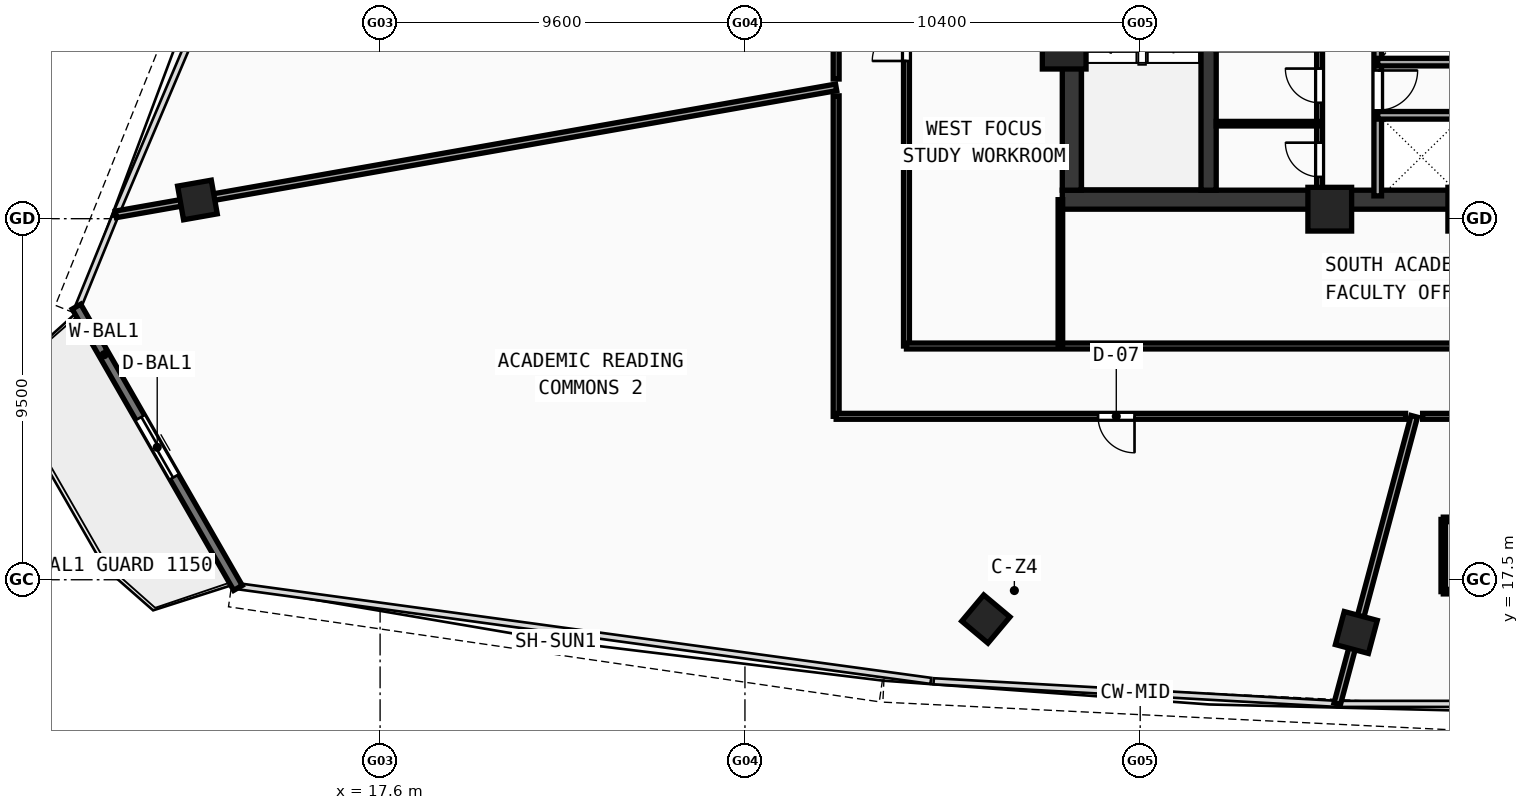
"""IFC4 building model, lengths in metres.
Left out: names, types, materials, properties, quantities, classifications, styles, units other than length and angle.
Written with IfcOpenShell. Run it as: python <this file> out.ifc"""

import sys

from ifc_helpers import new_model, si_unit, direction, frame, frame_2d, origin, origin_with_axes, origin_2d, place, context, subcontext, project, spatial, rectangle, hollow_rectangle, extrude, source, transform, mapped, element, fill, save


model = new_model("IFC4")
c1 = context("Model", 3, precision=1e-05, world=origin(), true_north=direction((0.0, 1.0)))
c2 = subcontext(c1, "Body", "Model", "MODEL_VIEW")
j1 = project(units=[si_unit("LENGTHUNIT", "METRE"), si_unit("PLANEANGLEUNIT", "RADIAN")], contexts=[c1])
p1 = place(None, origin())
s1 = spatial("IfcSite", under=j1, at=p1, CompositionType="ELEMENT")
p2 = place(p1, origin())
s2 = spatial("IfcBuilding", under=s1, at=p2, CompositionType="ELEMENT")
p3 = place(p2, frame((0.0, 0.0, 199.96)))
s3 = spatial("IfcBuildingStorey", under=s2, at=p3, CompositionType="ELEMENT", Elevation=199.96)
p4 = place(p3, frame((35.55, 27.5, 0.0), z_axis=(0.0, 0.0, 1.0), x_axis=(1.0, 0.0, 0.0)))
e1 = element("IfcWall", 1, at=p4, inside=s3, PredefinedType="SHEAR", context=c2, shape_type="SweptSolid", body=[
    extrude(rectangle(XDim=24.9, YDim=0.5, at=frame_2d((12.45, 0.0))), origin(), (0.0, 0.0, 1.0), 3.54),
])
p5 = place(p3, frame((35.8, 27.75, 0.0), z_axis=(0.0, 0.0, 1.0), x_axis=(0.0, 1.0, 0.0)))
e2 = element("IfcWall", 2, at=p5, inside=s3, PredefinedType="SHEAR", context=c2, shape_type="SweptSolid", body=[
    extrude(rectangle(XDim=12.2, YDim=0.5, at=frame_2d((6.1, 0.0))), origin(), (0.0, 0.0, 1.0), 3.54),
])
p6 = place(p3, frame((39.4, 27.75, 0.0), z_axis=(0.0, 0.0, 1.0), x_axis=(0.0, 1.0, 0.0)))
e3 = element("IfcWall", 3, at=p6, inside=s3, PredefinedType="SHEAR", context=c2, shape_type="SweptSolid", body=[
    extrude(rectangle(XDim=12.2, YDim=0.4, at=frame_2d((6.1, 0.0))), origin(), (0.0, 0.0, 1.0), 3.54),
])
p7 = place(p6, frame((10.0, 0.0, 0.0)))
e4 = element("IfcOpeningElement", 4, at=p7, cuts=e3, PredefinedType="OPENING", context=c2, shape_type="SweptSolid", body=[
    extrude(rectangle(XDim=1.1, YDim=2.1, at=frame_2d((0.55, 1.05))), frame((0.0, 0.21, 0.0), z_axis=(0.0, -1.0, 0.0), x_axis=(1.0, 0.0, 0.0)), (0.0, 0.0, 1.0), 0.42),
])
m1 = source(origin(), c2, "Body", "SweptSolid", [
    extrude(hollow_rectangle(XDim=1.15, YDim=1.15, WallThickness=0.048, at=origin_2d()), origin(), (0.0, 0.0, 1.0), 3.8),
])
for number, where, z_axis, x_axis in (
    (5, (42.588, 27.25, -0.26), (0.0, 0.0, 1.0), (1.0, 0.0, 0.0)),
    (6, (46.272, 27.25, -0.26), (0.0, 0.0, 1.0), (1.0, 0.0, 0.0)),
    (7, (35.6, 31.513, -0.26), (0.0, 0.0, 1.0), (1.0, 0.0, 0.0)),
):
    element("IfcColumn", number, at=place(p3, frame(where, z_axis=z_axis, x_axis=x_axis)), inside=s3, PredefinedType="COLUMN", context=c2, shape_type="MappedRepresentation", body=[
        mapped(m1, transform((0.0, 0.0, 0.0), scale=1.0)),
    ])
m2 = source(origin(), c2, "Body", "SweptSolid", [
    extrude(hollow_rectangle(XDim=0.9, YDim=0.9, WallThickness=0.036, at=origin_2d()), origin(), (0.0, 0.0, 1.0), 3.8),
])
for number, where, z_axis, x_axis in (
    (8, (33.539, 16.466, -0.26), (0.0, 0.0, 1.0), (0.766, -0.643, 0.0)),
    (9, (43.288, 16.112, -0.26), (0.0, 0.0, 1.0), (0.966, -0.259, 0.0)),
    (10, (12.793, 27.492, -0.26), (0.0, 0.0, 1.0), (0.174, -0.985, 0.0)),
):
    element("IfcColumn", number, at=place(p3, frame(where, z_axis=z_axis, x_axis=x_axis)), inside=s3, PredefinedType="COLUMN", context=c2, shape_type="MappedRepresentation", body=[
        mapped(m2, transform((0.0, 0.0, 0.0), scale=1.0)),
    ])
p8 = place(p3, frame((9.611, 24.686, 0.0), z_axis=(0.0, 0.0, 1.0), x_axis=(0.497930869929, -0.867216725376, 0.0)))
e11 = element("IfcWall", 11, at=p8, inside=s3, PredefinedType="STANDARD", context=c2, shape_type="SweptSolid", body=[
    extrude(rectangle(XDim=8.534, YDim=0.26, at=frame_2d((4.267, 0.0))), origin(), (0.0, 0.0, 1.0), 3.54),
])
p9 = place(p8, frame((3.367, 0.0, 0.0)))
e12 = element("IfcOpeningElement", 12, at=p9, cuts=e11, PredefinedType="OPENING", context=c2, shape_type="SweptSolid", body=[
    extrude(rectangle(XDim=1.8, YDim=2.15, at=frame_2d((0.9, 1.075))), frame((0.0, 0.14, 0.0), z_axis=(0.0, -1.0, 0.0), x_axis=(1.0, 0.0, 0.0)), (0.0, 0.0, 1.0), 0.28),
])
p10 = place(p3, frame((43.85, 27.6, 0.0), z_axis=(0.0, 0.0, 1.0), x_axis=(0.0, 1.0, 0.0)))
e13 = element("IfcWall", 13, at=p10, inside=s3, PredefinedType="SOLIDWALL", context=c2, shape_type="SweptSolid", body=[
    extrude(rectangle(XDim=6.22, YDim=0.2, at=frame_2d((3.11, 0.0))), origin(), (0.0, 0.0, 1.0), 3.54),
])
p11 = place(p10, frame((2.25, 0.0, 0.0)))
e14 = element("IfcOpeningElement", 14, at=p11, cuts=e13, PredefinedType="OPENING", context=c2, shape_type="SweptSolid", body=[
    extrude(rectangle(XDim=1.05, YDim=2.1, at=frame_2d((0.525, 1.05))), frame((0.0, 0.11, 0.0), z_axis=(0.0, -1.0, 0.0), x_axis=(1.0, 0.0, 0.0)), (0.0, 0.0, 1.0), 0.22),
])
p12 = place(p3, frame((43.85, 29.72, 0.0), z_axis=(0.0, 0.0, 1.0), x_axis=(1.0, 0.0, 0.0)))
e15 = element("IfcWall", 15, at=p12, inside=s3, PredefinedType="SOLIDWALL", context=c2, shape_type="SweptSolid", body=[
    extrude(rectangle(XDim=7.2, YDim=0.2, at=frame_2d((3.6, 0.0))), origin(), (0.0, 0.0, 1.0), 3.54),
])
p13 = place(p3, frame((43.85, 31.12, 0.0), z_axis=(0.0, 0.0, 1.0), x_axis=(1.0, 0.0, 0.0)))
e16 = element("IfcWall", 16, at=p13, inside=s3, PredefinedType="SOLIDWALL", context=c2, shape_type="SweptSolid", body=[
    extrude(rectangle(XDim=9.83, YDim=0.2, at=frame_2d((4.915, 0.0))), origin(), (0.0, 0.0, 1.0), 3.54),
])
p14 = place(p3, frame((42.32, 27.6, 0.0), z_axis=(0.0, 0.0, 1.0), x_axis=(0.0, 1.0, 0.0)))
e17 = element("IfcWall", 17, at=p14, inside=s3, PredefinedType="PARTITIONING", context=c2, shape_type="SweptSolid", body=[
    extrude(rectangle(XDim=5.9, YDim=0.155, at=frame_2d((2.95, 0.0))), origin(), (0.0, 0.0, 1.0), 3.54),
])
p15 = place(p14, frame((0.5, 0.0, 0.0)))
e18 = element("IfcOpeningElement", 18, at=p15, cuts=e17, PredefinedType="OPENING", context=c2, shape_type="SweptSolid", body=[
    extrude(rectangle(XDim=0.9, YDim=2.1, at=frame_2d((0.45, 1.05))), frame((0.0, 0.087, 0.0), z_axis=(0.0, -1.0, 0.0), x_axis=(1.0, 0.0, 0.0)), (0.0, 0.0, 1.0), 0.175),
])
p16 = place(p14, frame((2.45, 0.0, 0.0)))
e19 = element("IfcOpeningElement", 19, at=p16, cuts=e17, PredefinedType="OPENING", context=c2, shape_type="SweptSolid", body=[
    extrude(rectangle(XDim=0.9, YDim=2.1, at=frame_2d((0.45, 1.05))), frame((0.0, 0.087, 0.0), z_axis=(0.0, -1.0, 0.0), x_axis=(1.0, 0.0, 0.0)), (0.0, 0.0, 1.0), 0.175),
])
p17 = place(p14, frame((4.42, 0.0, 0.0)))
e20 = element("IfcOpeningElement", 20, at=p17, cuts=e17, PredefinedType="OPENING", context=c2, shape_type="SweptSolid", body=[
    extrude(rectangle(XDim=0.94, YDim=2.1, at=frame_2d((0.47, 1.05))), frame((0.0, 0.087, 0.0), z_axis=(0.0, -1.0, 0.0), x_axis=(1.0, 0.0, 0.0)), (0.0, 0.0, 1.0), 0.175),
])
p18 = place(p3, frame((39.6, 29.5, 0.0), z_axis=(0.0, 0.0, 1.0), x_axis=(1.0, 0.0, 0.0)))
e21 = element("IfcWall", 21, at=p18, inside=s3, PredefinedType="PARTITIONING", context=c2, shape_type="SweptSolid", body=[
    extrude(rectangle(XDim=2.72, YDim=0.12, at=frame_2d((1.36, 0.0))), origin(), (0.0, 0.0, 1.0), 3.54),
])
p19 = place(p3, frame((31.45, 23.65, 0.0), z_axis=(0.0, 0.0, 1.0), x_axis=(0.0, 1.0, 0.0)))
e22 = element("IfcWall", 22, at=p19, inside=s3, PredefinedType="PARTITIONING", context=c2, shape_type="SweptSolid", body=[
    extrude(rectangle(XDim=16.6, YDim=0.155, at=frame_2d((8.3, 0.0))), origin(), (0.0, 0.0, 1.0), 2.89),
])
p20 = place(p19, frame((7.5, 0.0, 0.0)))
e23 = element("IfcOpeningElement", 23, at=p20, cuts=e22, PredefinedType="OPENING", context=c2, shape_type="SweptSolid", body=[
    extrude(rectangle(XDim=0.9, YDim=2.08, at=frame_2d((0.45, 1.04))), frame((0.0, 0.087, 0.0), z_axis=(0.0, -1.0, 0.0), x_axis=(1.0, 0.0, 0.0)), (0.0, 0.0, 1.0), 0.175),
])
p21 = place(p3, frame((31.45, 23.65, 0.0), z_axis=(0.0, 0.0, 1.0), x_axis=(1.0, 0.0, 0.0)))
e24 = element("IfcWall", 24, at=p21, inside=s3, PredefinedType="PARTITIONING", context=c2, shape_type="SweptSolid", body=[
    extrude(rectangle(XDim=33.1, YDim=0.155, at=frame_2d((16.55, 0.0))), origin(), (0.0, 0.0, 1.0), 2.89),
])
p22 = place(p21, frame((16.0, 0.0, 0.0)))
e25 = element("IfcOpeningElement", 25, at=p22, cuts=e24, PredefinedType="OPENING", context=c2, shape_type="SweptSolid", body=[
    extrude(rectangle(XDim=0.92, YDim=2.1, at=frame_2d((0.46, 1.05))), frame((0.0, 0.087, 0.0), z_axis=(0.0, -1.0, 0.0), x_axis=(1.0, 0.0, 0.0)), (0.0, 0.0, 1.0), 0.175),
])
p23 = place(p3, frame((35.5, 23.65, 0.0), z_axis=(0.0, 0.0, 1.0), x_axis=(0.0, 1.0, 0.0)))
e26 = element("IfcWall", 26, at=p23, inside=s3, PredefinedType="PARTITIONING", context=c2, shape_type="SweptSolid", body=[
    extrude(rectangle(XDim=3.85, YDim=0.12, at=frame_2d((1.925, 0.0))), origin(), (0.0, 0.0, 1.0), 3.14),
])
p24 = place(p3, frame((29.6, 30.456, 0.0), z_axis=(0.0, 0.0, 1.0), x_axis=(-0.984807685374, -0.173648561263, 0.0)))
e27 = element("IfcWall", 27, at=p24, inside=s3, PredefinedType="PARTITIONING", context=c2, shape_type="SweptSolid", body=[
    extrude(rectangle(XDim=19.246, YDim=0.175, at=frame_2d((9.623, 0.0))), origin(), (0.0, 0.0, 1.0), 2.89),
])
p25 = place(p3, frame((44.811, 21.8, 0.0), z_axis=(0.0, 0.0, 1.0), x_axis=(-0.258810863021, -0.965928018634, 0.0)))
e28 = element("IfcWall", 28, at=p25, inside=s3, PredefinedType="PARTITIONING", context=c2, shape_type="SweptSolid", body=[
    extrude(rectangle(XDim=7.833, YDim=0.175, at=frame_2d((3.917, 0.0))), origin(), (0.0, 0.0, 1.0), 2.89),
])
p26 = place(p3, frame((29.6, 21.8, 0.0), z_axis=(0.0, 0.0, 1.0), x_axis=(0.0, 1.0, 0.0)))
e29 = element("IfcWall", 29, at=p26, inside=s3, PredefinedType="PARTITIONING", context=c2, shape_type="SweptSolid", body=[
    extrude(rectangle(XDim=8.432, YDim=0.155, at=frame_2d((4.216, 0.0))), origin(), (0.0, 0.0, 1.0), 3.14),
])
p27 = place(p3, frame((29.6, 30.675, 0.0), z_axis=(0.0, 0.0, 1.0), x_axis=(0.0, 1.0, 0.0)))
e30 = element("IfcWall", 30, at=p27, inside=s3, PredefinedType="PARTITIONING", context=c2, shape_type="SweptSolid", body=[
    extrude(rectangle(XDim=8.783, YDim=0.155, at=frame_2d((4.392, 0.0))), origin(), (0.0, 0.0, 1.0), 3.14),
])
p28 = place(p27, frame((3.932, 0.0, 0.0)))
e31 = element("IfcOpeningElement", 31, at=p28, cuts=e30, PredefinedType="OPENING", context=c2, shape_type="SweptSolid", body=[
    extrude(rectangle(XDim=0.92, YDim=2.1, at=frame_2d((0.46, 1.05))), frame((0.0, 0.087, 0.0), z_axis=(0.0, -1.0, 0.0), x_axis=(1.0, 0.0, 0.0)), (0.0, 0.0, 1.0), 0.175),
])
p29 = place(p3, frame((50.969, 21.8, 0.0), z_axis=(0.0, 0.0, 1.0), x_axis=(-1.0, 0.0, 0.0)))
e32 = element("IfcWall", 32, at=p29, inside=s3, PredefinedType="PARTITIONING", context=c2, shape_type="SweptSolid", body=[
    extrude(rectangle(XDim=5.938, YDim=0.155, at=frame_2d((2.969, 0.0))), origin(), (0.0, 0.0, 1.0), 3.54),
])
p30 = place(p29, frame((2.494, 0.0, 0.0)))
e33 = element("IfcOpeningElement", 33, at=p30, cuts=e32, PredefinedType="OPENING", context=c2, shape_type="SweptSolid", body=[
    extrude(rectangle(XDim=0.96, YDim=2.12, at=frame_2d((0.48, 1.06))), frame((0.0, 0.087, 0.0), z_axis=(0.0, -1.0, 0.0), x_axis=(1.0, 0.0, 0.0)), (0.0, 0.0, 1.0), 0.175),
])
p31 = place(p3, frame((44.583, 21.8, 0.0), z_axis=(0.0, 0.0, 1.0), x_axis=(-1.0, 0.0, 0.0)))
e34 = element("IfcWall", 34, at=p31, inside=s3, PredefinedType="PARTITIONING", context=c2, shape_type="SweptSolid", body=[
    extrude(rectangle(XDim=14.983, YDim=0.155, at=frame_2d((7.492, 0.0))), origin(), (0.0, 0.0, 1.0), 2.89),
])
p32 = place(p31, frame((7.133, 0.0, 0.0)))
e35 = element("IfcOpeningElement", 35, at=p32, cuts=e34, PredefinedType="OPENING", context=c2, shape_type="SweptSolid", body=[
    extrude(rectangle(XDim=0.96, YDim=2.12, at=frame_2d((0.48, 1.06))), frame((0.0, 0.087, 0.0), z_axis=(0.0, -1.0, 0.0), x_axis=(1.0, 0.0, 0.0)), (0.0, 0.0, 1.0), 0.175),
])
p33 = place(p3, frame((45.575, 17.187, 0.0), z_axis=(0.0, 0.0, 1.0), x_axis=(1.0, 0.0, 0.0)))
e36 = element("IfcWall", 36, at=p33, inside=s3, PredefinedType="PARTITIONING", context=c2, shape_type="SweptSolid", body=[
    extrude(rectangle(XDim=2.05, YDim=0.12, at=frame_2d((1.025, 0.0))), origin(), (0.0, 0.0, 1.0), 3.54),
])
p34 = place(p33, frame((0.6, 0.0, 0.0)))
e37 = element("IfcOpeningElement", 37, at=p34, cuts=e36, PredefinedType="OPENING", context=c2, shape_type="SweptSolid", body=[
    extrude(rectangle(XDim=0.85, YDim=2.1, at=frame_2d((0.425, 1.05))), frame((0.0, 0.07, 0.0), z_axis=(0.0, -1.0, 0.0), x_axis=(1.0, 0.0, 0.0)), (0.0, 0.0, 1.0), 0.14),
])
p35 = place(p3, frame((47.625, 19.087, 0.0), z_axis=(0.0, 0.0, 1.0), x_axis=(-1.0, 0.0, 0.0)))
e38 = element("IfcWall", 38, at=p35, inside=s3, PredefinedType="PARTITIONING", context=c2, shape_type="SweptSolid", body=[
    extrude(rectangle(XDim=2.05, YDim=0.12, at=frame_2d((1.025, 0.0))), origin(), (0.0, 0.0, 1.0), 3.54),
])
p36 = place(p3, frame((45.575, 19.087, 0.0), z_axis=(0.0, 0.0, 1.0), x_axis=(0.0, -1.0, 0.0)))
e39 = element("IfcWall", 39, at=p36, inside=s3, PredefinedType="PARTITIONING", context=c2, shape_type="SweptSolid", body=[
    extrude(rectangle(XDim=1.9, YDim=0.12, at=frame_2d((0.95, 0.0))), origin(), (0.0, 0.0, 1.0), 3.54),
])
m3 = source(origin(), c2, "Body", "SweptSolid", [
    extrude(rectangle(XDim=1.8, YDim=2.15, at=frame_2d((0.9, 1.075))), frame((0.0, 0.025, 0.0), z_axis=(0.0, -1.0, 0.0), x_axis=(1.0, 0.0, 0.0)), (0.0, 0.0, 1.0), 0.05),
])
p37 = place(p9, origin_with_axes())
e40 = element("IfcDoor", 40, at=p37, inside=s3, OperationType="DOUBLE_DOOR_SLIDING", PredefinedType="DOOR", context=c2, shape_type="MappedRepresentation", body=[
    mapped(m3, transform((0.0, 0.0, 0.0), scale=1.0)),
])
fill(e12, e40)
m4 = source(origin(), c2, "Body", "SweptSolid", [
    extrude(rectangle(XDim=1.05, YDim=2.1, at=frame_2d((0.525, 1.05))), frame((0.0, 0.025, 0.0), z_axis=(0.0, -1.0, 0.0), x_axis=(1.0, 0.0, 0.0)), (0.0, 0.0, 1.0), 0.05),
])
p38 = place(p11, frame((1.05, 0.0, 0.0), z_axis=(0.0, 0.0, 1.0), x_axis=(-1.0, 0.0, 0.0)))
e41 = element("IfcDoor", 41, at=p38, inside=s3, OperationType="SINGLE_SWING_LEFT", PredefinedType="DOOR", context=c2, shape_type="MappedRepresentation", body=[
    mapped(m4, transform((0.0, 0.0, 0.0), scale=1.0)),
])
fill(e14, e41)
m5 = source(origin(), c2, "Body", "SweptSolid", [
    extrude(rectangle(XDim=0.9, YDim=2.1, at=frame_2d((0.45, 1.05))), frame((0.0, 0.025, 0.0), z_axis=(0.0, -1.0, 0.0), x_axis=(1.0, 0.0, 0.0)), (0.0, 0.0, 1.0), 0.05),
])
p39 = place(p15, origin_with_axes())
e42 = element("IfcDoor", 42, at=p39, inside=s3, OperationType="SINGLE_SWING_RIGHT", PredefinedType="DOOR", context=c2, shape_type="MappedRepresentation", body=[
    mapped(m5, transform((0.0, 0.0, 0.0), scale=1.0)),
])
fill(e18, e42)
p40 = place(p16, origin_with_axes())
e43 = element("IfcDoor", 43, at=p40, inside=s3, OperationType="SINGLE_SWING_RIGHT", PredefinedType="DOOR", context=c2, shape_type="MappedRepresentation", body=[
    mapped(m5, transform((0.0, 0.0, 0.0), scale=1.0)),
])
fill(e19, e43)
m6 = source(origin(), c2, "Body", "SweptSolid", [
    extrude(rectangle(XDim=0.9, YDim=2.08, at=frame_2d((0.45, 1.04))), frame((0.0, 0.025, 0.0), z_axis=(0.0, -1.0, 0.0), x_axis=(1.0, 0.0, 0.0)), (0.0, 0.0, 1.0), 0.05),
])
p41 = place(p20, origin_with_axes())
e44 = element("IfcDoor", 44, at=p41, inside=s3, OperationType="SINGLE_SWING_LEFT", PredefinedType="DOOR", context=c2, shape_type="MappedRepresentation", body=[
    mapped(m6, transform((0.0, 0.0, 0.0), scale=1.0)),
])
fill(e23, e44)
m7 = source(origin(), c2, "Body", "SweptSolid", [
    extrude(rectangle(XDim=0.96, YDim=2.12, at=frame_2d((0.48, 1.06))), frame((0.0, 0.025, 0.0), z_axis=(0.0, -1.0, 0.0), x_axis=(1.0, 0.0, 0.0)), (0.0, 0.0, 1.0), 0.05),
])
p42 = place(p32, origin_with_axes())
e45 = element("IfcDoor", 45, at=p42, inside=s3, OperationType="SINGLE_SWING_LEFT", PredefinedType="DOOR", context=c2, shape_type="MappedRepresentation", body=[
    mapped(m7, transform((0.0, 0.0, 0.0), scale=1.0)),
])
fill(e35, e45)
save(model, sys.argv[1])
